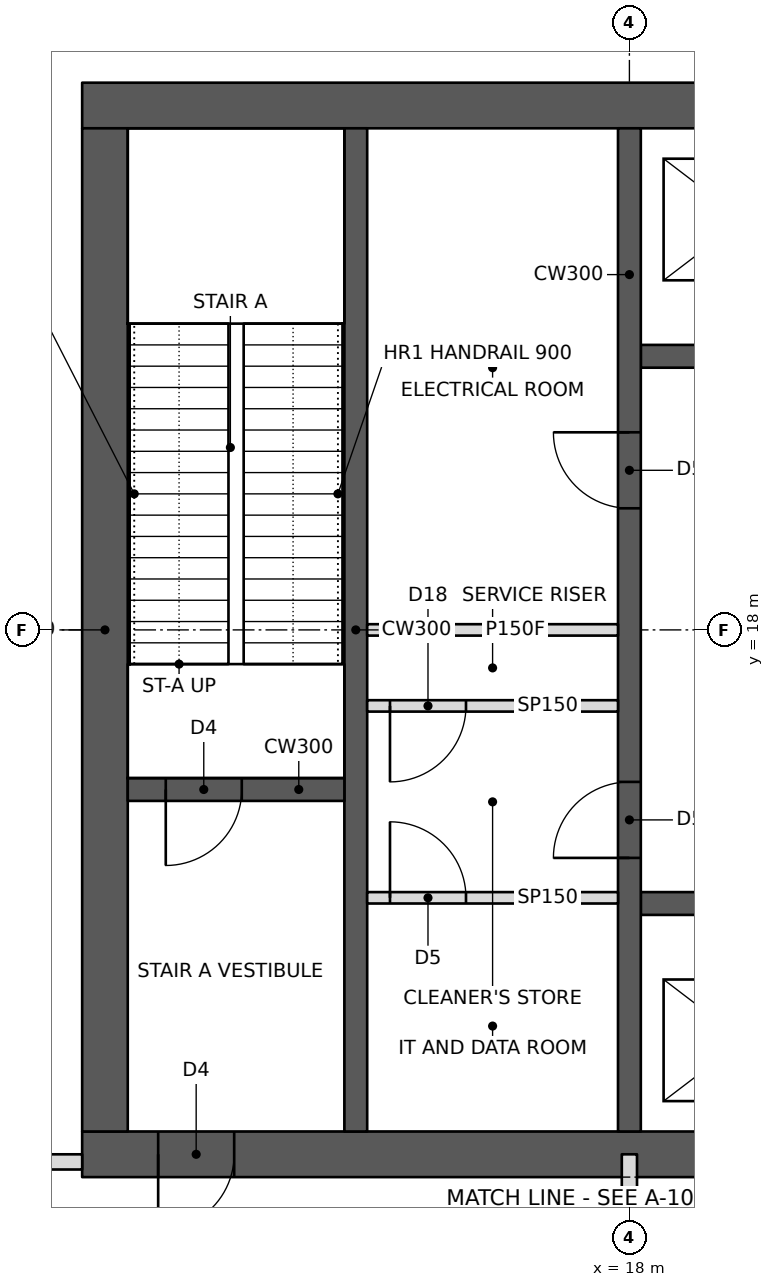
"""IFC4 building model, lengths in metres.
Left out: names, types, materials, properties, quantities, classifications, styles, units other than length and angle.
Written with IfcOpenShell. Run it as: python <this file> out.ifc"""

import sys

from ifc_helpers import new_model, si_unit, direction, frame, frame_2d, origin, place, context, subcontext, project, spatial, rectangle, extrude, element, fill, save


model = new_model("IFC4")
c1 = context("Model", 3, precision=1e-05, world=origin(), true_north=direction((0.0, 1.0)))
c2 = subcontext(c1, "Body", "Model", "MODEL_VIEW")
j1 = project(units=[si_unit("LENGTHUNIT", "METRE"), si_unit("PLANEANGLEUNIT", "RADIAN")], contexts=[c1])
p1 = place(None, origin())
s1 = spatial("IfcSite", under=j1, at=p1, CompositionType="ELEMENT")
p2 = place(p1, origin())
s2 = spatial("IfcBuilding", under=s1, at=p2, CompositionType="ELEMENT")
p3 = place(p2, origin())
s3 = spatial("IfcBuildingStorey", under=s2, at=p3, CompositionType="ELEMENT", Elevation=0.0)
p4 = place(p3, frame((10.8, 11.1, 0.0), z_axis=(0.0, 0.0, 1.0), x_axis=(1.0, 0.0, 0.0)))
e1 = element("IfcWall", 1, at=p4, inside=s3, PredefinedType="SHEAR", context=c2, shape_type="SweptSolid", body=[
    extrude(rectangle(XDim=23.4, YDim=0.6, at=frame_2d((11.7, 0.0))), origin(), (0.0, 0.0, 1.0), 6.0),
])
p5 = place(p4, frame((1.0, 0.0, 0.0)))
e2 = element("IfcOpeningElement", 2, at=p5, cuts=e1, PredefinedType="OPENING", context=c2, shape_type="SweptSolid", body=[
    extrude(rectangle(XDim=1.0, YDim=2.1, at=frame_2d((0.5, 1.05))), frame((0.0, 0.31, 0.0), z_axis=(0.0, -1.0, 0.0), x_axis=(1.0, 0.0, 0.0)), (0.0, 0.0, 1.0), 0.62),
])
p6 = place(p4, frame((17.2, 0.0, 0.0)))
e3 = element("IfcOpeningElement", 3, at=p6, cuts=e1, PredefinedType="OPENING", context=c2, shape_type="SweptSolid", body=[
    extrude(rectangle(XDim=1.8, YDim=2.1, at=frame_2d((0.9, 1.05))), frame((0.0, 0.31, 0.0), z_axis=(0.0, -1.0, 0.0), x_axis=(1.0, 0.0, 0.0)), (0.0, 0.0, 1.0), 0.62),
])
p7 = place(p3, frame((10.8, 24.9, 0.0), z_axis=(0.0, 0.0, 1.0), x_axis=(1.0, 0.0, 0.0)))
e4 = element("IfcWall", 4, at=p7, inside=s3, PredefinedType="SHEAR", context=c2, shape_type="SweptSolid", body=[
    extrude(rectangle(XDim=23.4, YDim=0.6, at=frame_2d((11.7, 0.0))), origin(), (0.0, 0.0, 1.0), 6.0),
])
p8 = place(p7, frame((17.2, 0.0, 0.0)))
e5 = element("IfcOpeningElement", 5, at=p8, cuts=e4, PredefinedType="OPENING", context=c2, shape_type="SweptSolid", body=[
    extrude(rectangle(XDim=1.8, YDim=2.1, at=frame_2d((0.9, 1.05))), frame((0.0, 0.31, 0.0), z_axis=(0.0, -1.0, 0.0), x_axis=(1.0, 0.0, 0.0)), (0.0, 0.0, 1.0), 0.62),
])
p9 = place(p7, frame((21.1, 0.0, 0.0)))
e6 = element("IfcOpeningElement", 6, at=p9, cuts=e4, PredefinedType="OPENING", context=c2, shape_type="SweptSolid", body=[
    extrude(rectangle(XDim=1.0, YDim=2.1, at=frame_2d((0.5, 1.05))), frame((0.0, 0.31, 0.0), z_axis=(0.0, -1.0, 0.0), x_axis=(1.0, 0.0, 0.0)), (0.0, 0.0, 1.0), 0.62),
])
p10 = place(p3, frame((11.1, 11.4, 0.0), z_axis=(0.0, 0.0, 1.0), x_axis=(0.0, 1.0, 0.0)))
e7 = element("IfcWall", 7, at=p10, inside=s3, PredefinedType="SHEAR", context=c2, shape_type="SweptSolid", body=[
    extrude(rectangle(XDim=13.2, YDim=0.6, at=frame_2d((6.6, 0.0))), origin(), (0.0, 0.0, 1.0), 6.0),
])
p11 = place(p3, frame((14.4, 11.4, 0.0), z_axis=(0.0, 0.0, 1.0), x_axis=(0.0, 1.0, 0.0)))
e8 = element("IfcWall", 8, at=p11, inside=s3, PredefinedType="SHEAR", context=c2, shape_type="SweptSolid", body=[
    extrude(rectangle(XDim=13.2, YDim=0.3, at=frame_2d((6.6, 0.0))), origin(), (0.0, 0.0, 1.0), 6.0),
])
p12 = place(p3, frame((11.4, 15.9, 0.0), z_axis=(0.0, 0.0, 1.0), x_axis=(1.0, 0.0, 0.0)))
e9 = element("IfcWall", 9, at=p12, inside=s3, PredefinedType="SHEAR", context=c2, shape_type="SweptSolid", body=[
    extrude(rectangle(XDim=2.85, YDim=0.3, at=frame_2d((1.425, 0.0))), origin(), (0.0, 0.0, 1.0), 6.0),
])
p13 = place(p12, frame((0.5, 0.0, 0.0)))
e10 = element("IfcOpeningElement", 10, at=p13, cuts=e9, PredefinedType="OPENING", context=c2, shape_type="SweptSolid", body=[
    extrude(rectangle(XDim=1.0, YDim=2.1, at=frame_2d((0.5, 1.05))), frame((0.0, 0.16, 0.0), z_axis=(0.0, -1.0, 0.0), x_axis=(1.0, 0.0, 0.0)), (0.0, 0.0, 1.0), 0.32),
])
p14 = place(p3, frame((18.0, 11.4, 0.0), z_axis=(0.0, 0.0, 1.0), x_axis=(0.0, 1.0, 0.0)))
e11 = element("IfcWall", 11, at=p14, inside=s3, PredefinedType="SHEAR", context=c2, shape_type="SweptSolid", body=[
    extrude(rectangle(XDim=13.2, YDim=0.3, at=frame_2d((6.6, 0.0))), origin(), (0.0, 0.0, 1.0), 6.0),
])
p15 = place(p14, frame((3.6, 0.0, 0.0)))
e12 = element("IfcOpeningElement", 12, at=p15, cuts=e11, PredefinedType="OPENING", context=c2, shape_type="SweptSolid", body=[
    extrude(rectangle(XDim=1.0, YDim=2.1, at=frame_2d((0.5, 1.05))), frame((0.0, 0.16, 0.0), z_axis=(0.0, -1.0, 0.0), x_axis=(1.0, 0.0, 0.0)), (0.0, 0.0, 1.0), 0.32),
])
p16 = place(p14, frame((8.2, 0.0, 0.0)))
e13 = element("IfcOpeningElement", 13, at=p16, cuts=e11, PredefinedType="OPENING", context=c2, shape_type="SweptSolid", body=[
    extrude(rectangle(XDim=1.0, YDim=2.1, at=frame_2d((0.5, 1.05))), frame((0.0, 0.16, 0.0), z_axis=(0.0, -1.0, 0.0), x_axis=(1.0, 0.0, 0.0)), (0.0, 0.0, 1.0), 0.32),
])
p17 = place(p3, frame((14.55, 18.0, 0.0), z_axis=(0.0, 0.0, 1.0), x_axis=(1.0, 0.0, 0.0)))
e14 = element("IfcWall", 14, at=p17, inside=s3, PredefinedType="PARTITIONING", context=c2, shape_type="SweptSolid", body=[
    extrude(rectangle(XDim=3.3, YDim=0.15, at=frame_2d((1.65, 0.0))), origin(), (0.0, 0.0, 1.0), 5.75),
])
p18 = place(p3, frame((18.15, 14.4, 0.0), z_axis=(0.0, 0.0, 1.0), x_axis=(1.0, 0.0, 0.0)))
e15 = element("IfcWall", 15, at=p18, inside=s3, PredefinedType="SHEAR", context=c2, shape_type="SweptSolid", body=[
    extrude(rectangle(XDim=9.0, YDim=0.3, at=frame_2d((4.5, 0.0))), origin(), (0.0, 0.0, 1.0), 6.0),
])
p19 = place(p18, frame((0.8, 0.0, 0.0)))
e16 = element("IfcOpeningElement", 16, at=p19, cuts=e15, PredefinedType="OPENING", context=c2, shape_type="SweptSolid", body=[
    extrude(rectangle(XDim=1.1, YDim=2.1, at=frame_2d((0.55, 1.05))), frame((0.0, 0.16, 0.0), z_axis=(0.0, -1.0, 0.0), x_axis=(1.0, 0.0, 0.0)), (0.0, 0.0, 1.0), 0.32),
])
p20 = place(p18, frame((3.8, 0.0, 0.0)))
e17 = element("IfcOpeningElement", 17, at=p20, cuts=e15, PredefinedType="OPENING", context=c2, shape_type="SweptSolid", body=[
    extrude(rectangle(XDim=1.1, YDim=2.1, at=frame_2d((0.55, 1.05))), frame((0.0, 0.16, 0.0), z_axis=(0.0, -1.0, 0.0), x_axis=(1.0, 0.0, 0.0)), (0.0, 0.0, 1.0), 0.32),
])
p21 = place(p18, frame((6.75, 0.0, 0.0)))
e18 = element("IfcOpeningElement", 18, at=p21, cuts=e15, PredefinedType="OPENING", context=c2, shape_type="SweptSolid", body=[
    extrude(rectangle(XDim=1.2, YDim=2.1, at=frame_2d((0.6, 1.05))), frame((0.0, 0.16, 0.0), z_axis=(0.0, -1.0, 0.0), x_axis=(1.0, 0.0, 0.0)), (0.0, 0.0, 1.0), 0.32),
])
p22 = place(p3, frame((18.15, 21.6, 0.0), z_axis=(0.0, 0.0, 1.0), x_axis=(1.0, 0.0, 0.0)))
e19 = element("IfcWall", 19, at=p22, inside=s3, PredefinedType="SHEAR", context=c2, shape_type="SweptSolid", body=[
    extrude(rectangle(XDim=9.0, YDim=0.3, at=frame_2d((4.5, 0.0))), origin(), (0.0, 0.0, 1.0), 6.0),
])
p23 = place(p22, frame((0.8, 0.0, 0.0)))
e20 = element("IfcOpeningElement", 20, at=p23, cuts=e19, PredefinedType="OPENING", context=c2, shape_type="SweptSolid", body=[
    extrude(rectangle(XDim=1.1, YDim=2.1, at=frame_2d((0.55, 1.05))), frame((0.0, 0.16, 0.0), z_axis=(0.0, -1.0, 0.0), x_axis=(1.0, 0.0, 0.0)), (0.0, 0.0, 1.0), 0.32),
])
p24 = place(p22, frame((3.8, 0.0, 0.0)))
e21 = element("IfcOpeningElement", 21, at=p24, cuts=e19, PredefinedType="OPENING", context=c2, shape_type="SweptSolid", body=[
    extrude(rectangle(XDim=1.1, YDim=2.1, at=frame_2d((0.55, 1.05))), frame((0.0, 0.16, 0.0), z_axis=(0.0, -1.0, 0.0), x_axis=(1.0, 0.0, 0.0)), (0.0, 0.0, 1.0), 0.32),
])
p25 = place(p22, frame((6.75, 0.0, 0.0)))
e22 = element("IfcOpeningElement", 22, at=p25, cuts=e19, PredefinedType="OPENING", context=c2, shape_type="SweptSolid", body=[
    extrude(rectangle(XDim=1.2, YDim=2.1, at=frame_2d((0.6, 1.05))), frame((0.0, 0.16, 0.0), z_axis=(0.0, -1.0, 0.0), x_axis=(1.0, 0.0, 0.0)), (0.0, 0.0, 1.0), 0.32),
])
p26 = place(p3, frame((9.0, 11.0, 0.0), z_axis=(0.0, 0.0, 1.0), x_axis=(1.0, 0.0, 0.0)))
e23 = element("IfcWall", 23, at=p26, inside=s3, PredefinedType="PARTITIONING", context=c2, shape_type="SweptSolid", body=[
    extrude(rectangle(XDim=1.8, YDim=0.2, at=frame_2d((0.9, 0.0))), origin(), (0.0, 0.0, 1.0), 4.891),
])
p27 = place(p3, frame((18.0, 9.4, 0.0), z_axis=(0.0, 0.0, 1.0), x_axis=(0.0, 1.0, 0.0)))
e24 = element("IfcWall", 24, at=p27, inside=s3, PredefinedType="PARTITIONING", context=c2, shape_type="SweptSolid", body=[
    extrude(rectangle(XDim=1.7, YDim=0.2, at=frame_2d((0.85, 0.0))), origin(), (0.0, 0.0, 1.0), 5.75),
])
p28 = place(p3, frame((14.55, 17.0, 0.0), z_axis=(0.0, 0.0, 1.0), x_axis=(1.0, 0.0, 0.0)))
e25 = element("IfcWall", 25, at=p28, inside=s3, PredefinedType="PARTITIONING", context=c2, shape_type="SweptSolid", body=[
    extrude(rectangle(XDim=3.3, YDim=0.15, at=frame_2d((1.65, 0.0))), origin(), (0.0, 0.0, 1.0), 5.75),
])
p29 = place(p28, frame((0.3, 0.0, 0.0)))
e26 = element("IfcOpeningElement", 26, at=p29, cuts=e25, PredefinedType="OPENING", context=c2, shape_type="SweptSolid", body=[
    extrude(rectangle(XDim=1.0, YDim=2.1, at=frame_2d((0.5, 1.05))), frame((0.0, 0.085, 0.0), z_axis=(0.0, -1.0, 0.0), x_axis=(1.0, 0.0, 0.0)), (0.0, 0.0, 1.0), 0.17),
])
p30 = place(p3, frame((14.55, 14.475, 0.0), z_axis=(0.0, 0.0, 1.0), x_axis=(1.0, 0.0, 0.0)))
e27 = element("IfcWall", 27, at=p30, inside=s3, PredefinedType="PARTITIONING", context=c2, shape_type="SweptSolid", body=[
    extrude(rectangle(XDim=3.3, YDim=0.15, at=frame_2d((1.65, 0.0))), origin(), (0.0, 0.0, 1.0), 5.75),
])
p31 = place(p30, frame((0.3, 0.0, 0.0)))
e28 = element("IfcOpeningElement", 28, at=p31, cuts=e27, PredefinedType="OPENING", context=c2, shape_type="SweptSolid", body=[
    extrude(rectangle(XDim=1.0, YDim=2.1, at=frame_2d((0.5, 1.05))), frame((0.0, 0.085, 0.0), z_axis=(0.0, -1.0, 0.0), x_axis=(1.0, 0.0, 0.0)), (0.0, 0.0, 1.0), 0.17),
])
p32 = place(p29, frame((1.0, 0.0, 0.0), z_axis=(0.0, 0.0, 1.0), x_axis=(-1.0, 0.0, 0.0)))
e29 = element("IfcDoor", 29, at=p32, inside=s3, OperationType="SINGLE_SWING_RIGHT", PredefinedType="DOOR", context=c2, shape_type="SweptSolid", body=[
    extrude(rectangle(XDim=1.0, YDim=2.1, at=frame_2d((0.5, 1.05))), frame((0.0, 0.025, 0.0), z_axis=(0.0, -1.0, 0.0), x_axis=(1.0, 0.0, 0.0)), (0.0, 0.0, 1.0), 0.05),
])
fill(e26, e29)
p33 = place(p31, origin())
e30 = element("IfcDoor", 30, at=p33, inside=s3, OperationType="SINGLE_SWING_LEFT", PredefinedType="DOOR", context=c2, shape_type="SweptSolid", body=[
    extrude(rectangle(XDim=1.0, YDim=2.1, at=frame_2d((0.5, 1.05))), frame((0.0, 0.025, 0.0), z_axis=(0.0, -1.0, 0.0), x_axis=(1.0, 0.0, 0.0)), (0.0, 0.0, 1.0), 0.05),
])
fill(e28, e30)
p34 = place(p5, frame((1.0, 0.0, 0.0), z_axis=(0.0, 0.0, 1.0), x_axis=(-1.0, 0.0, 0.0)))
e31 = element("IfcDoor", 31, at=p34, inside=s3, OperationType="SINGLE_SWING_RIGHT", PredefinedType="DOOR", context=c2, shape_type="SweptSolid", body=[
    extrude(rectangle(XDim=1.0, YDim=2.1, at=frame_2d((0.5, 1.05))), frame((0.0, 0.025, 0.0), z_axis=(0.0, -1.0, 0.0), x_axis=(1.0, 0.0, 0.0)), (0.0, 0.0, 1.0), 0.05),
])
fill(e2, e31)
p35 = place(p13, frame((1.0, 0.0, 0.0), z_axis=(0.0, 0.0, 1.0), x_axis=(-1.0, 0.0, 0.0)))
e32 = element("IfcDoor", 32, at=p35, inside=s3, OperationType="SINGLE_SWING_RIGHT", PredefinedType="DOOR", context=c2, shape_type="SweptSolid", body=[
    extrude(rectangle(XDim=1.0, YDim=2.1, at=frame_2d((0.5, 1.05))), frame((0.0, 0.025, 0.0), z_axis=(0.0, -1.0, 0.0), x_axis=(1.0, 0.0, 0.0)), (0.0, 0.0, 1.0), 0.05),
])
fill(e10, e32)
p36 = place(p15, origin())
e33 = element("IfcDoor", 33, at=p36, inside=s3, OperationType="SINGLE_SWING_LEFT", PredefinedType="DOOR", context=c2, shape_type="SweptSolid", body=[
    extrude(rectangle(XDim=1.0, YDim=2.1, at=frame_2d((0.5, 1.05))), frame((0.0, 0.025, 0.0), z_axis=(0.0, -1.0, 0.0), x_axis=(1.0, 0.0, 0.0)), (0.0, 0.0, 1.0), 0.05),
])
fill(e12, e33)
p37 = place(p16, origin())
e34 = element("IfcDoor", 34, at=p37, inside=s3, OperationType="SINGLE_SWING_RIGHT", PredefinedType="DOOR", context=c2, shape_type="SweptSolid", body=[
    extrude(rectangle(XDim=1.0, YDim=2.1, at=frame_2d((0.5, 1.05))), frame((0.0, 0.025, 0.0), z_axis=(0.0, -1.0, 0.0), x_axis=(1.0, 0.0, 0.0)), (0.0, 0.0, 1.0), 0.05),
])
fill(e13, e34)
save(model, sys.argv[1])
